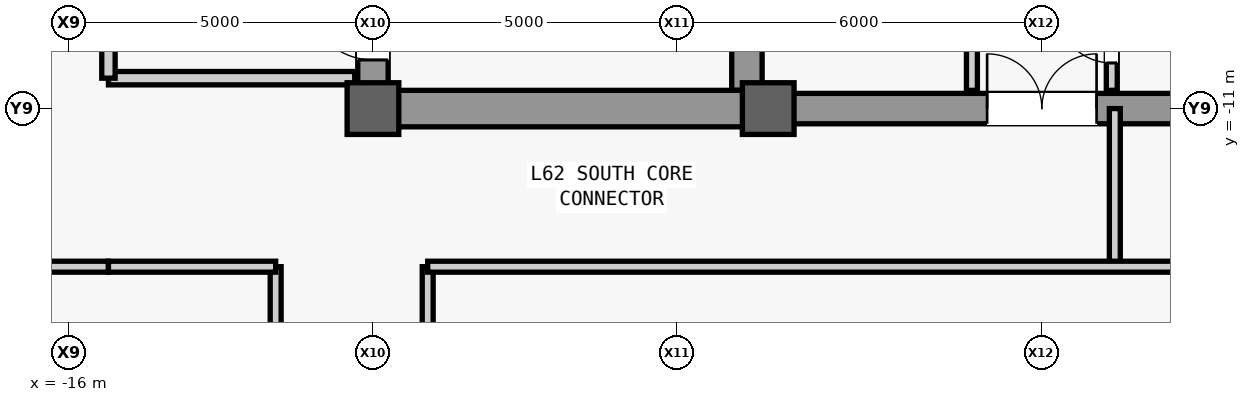
"""IFC4 building model, lengths in metres.
Left out: names, types, materials, properties, quantities, classifications, styles, units other than length and angle.
Written with IfcOpenShell. Run it as: python <this file> out.ifc"""

import sys

from ifc_helpers import new_model, si_unit, direction, frame, frame_2d, origin, origin_2d, place, context, subcontext, project, spatial, rectangle, extrude, source, transform, mapped, element, fill, save


model = new_model("IFC4")
c1 = context("Model", 3, precision=1e-05, world=origin(), true_north=direction((0.0, 1.0)))
c2 = subcontext(c1, "Body", "Model", "MODEL_VIEW")
j1 = project(units=[si_unit("LENGTHUNIT", "METRE"), si_unit("PLANEANGLEUNIT", "RADIAN")], contexts=[c1])
p1 = place(None, origin())
s1 = spatial("IfcSite", under=j1, at=p1, CompositionType="ELEMENT")
p2 = place(p1, origin())
s2 = spatial("IfcBuilding", under=s1, at=p2, CompositionType="ELEMENT")
p3 = place(p2, frame((0.0, 0.0, 263.1)))
s3 = spatial("IfcBuildingStorey", under=s2, at=p3, CompositionType="ELEMENT", Elevation=263.1)
m1 = source(origin(), c2, "Body", "SweptSolid", [
    extrude(rectangle(XDim=22.0, YDim=0.5, at=frame_2d((11.0, 0.0))), origin(), (0.0, 0.0, 1.0), 4.6),
])
p4 = place(p3, frame((-11.0, -11.0, 0.0), z_axis=(0.0, 0.0, 1.0), x_axis=(0.0, 1.0, 0.0)))
e1 = element("IfcWall", 1, at=p4, inside=s3, PredefinedType="SHEAR", context=c2, shape_type="MappedRepresentation", body=[
    mapped(m1, transform((0.0, 0.0, 0.0), scale=1.0)),
])
m2 = source(origin(), c2, "Body", "SweptSolid", [
    extrude(rectangle(XDim=1.1, YDim=2.2, at=frame_2d((0.55, 1.1))), frame((0.0, 0.26, 0.0), z_axis=(0.0, -1.0, 0.0), x_axis=(1.0, 0.0, 0.0)), (0.0, 0.0, 1.0), 0.52),
])
p5 = place(p4, frame((0.8, 0.0, 0.0)))
e2 = element("IfcOpeningElement", 2, at=p5, cuts=e1, PredefinedType="OPENING", context=c2, shape_type="MappedRepresentation", body=[
    mapped(m2, transform((0.0, 0.0, 0.0), scale=1.0)),
])
p6 = place(p4, frame((12.5, 0.0, 0.0)))
e3 = element("IfcOpeningElement", 3, at=p6, cuts=e1, PredefinedType="OPENING", context=c2, shape_type="MappedRepresentation", body=[
    mapped(m2, transform((0.0, 0.0, 0.0), scale=1.0)),
])
m3 = source(origin(), c2, "Body", "SweptSolid", [
    extrude(rectangle(XDim=0.9, YDim=2.15, at=frame_2d((0.45, 1.075))), frame((0.0, 0.26, 0.0), z_axis=(0.0, -1.0, 0.0), x_axis=(1.0, 0.0, 0.0)), (0.0, 0.0, 1.0), 0.52),
])
p7 = place(p4, frame((6.2, 0.0, 0.0)))
e4 = element("IfcOpeningElement", 4, at=p7, cuts=e1, PredefinedType="OPENING", context=c2, shape_type="MappedRepresentation", body=[
    mapped(m3, transform((0.0, 0.0, 0.0), scale=1.0)),
])
p8 = place(p4, frame((8.05, 0.0, 0.0)))
e5 = element("IfcOpeningElement", 5, at=p8, cuts=e1, PredefinedType="OPENING", context=c2, shape_type="MappedRepresentation", body=[
    mapped(m3, transform((0.0, 0.0, 0.0), scale=1.0)),
])
m4 = source(origin(), c2, "Body", "SweptSolid", [
    extrude(rectangle(XDim=1.2, YDim=2.3, at=frame_2d((0.6, 1.15))), frame((0.0, 0.26, 0.0), z_axis=(0.0, -1.0, 0.0), x_axis=(1.0, 0.0, 0.0)), (0.0, 0.0, 1.0), 0.52),
])
p9 = place(p4, frame((14.6, 0.0, 0.0)))
e6 = element("IfcOpeningElement", 6, at=p9, cuts=e1, PredefinedType="OPENING", context=c2, shape_type="MappedRepresentation", body=[
    mapped(m4, transform((0.0, 0.0, 0.0), scale=1.0)),
])
p10 = place(p4, frame((18.2, 0.0, 0.0)))
e7 = element("IfcOpeningElement", 7, at=p10, cuts=e1, PredefinedType="OPENING", context=c2, shape_type="MappedRepresentation", body=[
    mapped(m4, transform((0.0, 0.0, 0.0), scale=1.0)),
])
m5 = source(origin(), c2, "Body", "SweptSolid", [
    extrude(rectangle(XDim=1.3, YDim=2.3, at=frame_2d((0.65, 1.15))), frame((0.0, 0.26, 0.0), z_axis=(0.0, -1.0, 0.0), x_axis=(1.0, 0.0, 0.0)), (0.0, 0.0, 1.0), 0.52),
])
p11 = place(p4, frame((2.7, 0.0, 0.0)))
e8 = element("IfcOpeningElement", 8, at=p11, cuts=e1, PredefinedType="OPENING", context=c2, shape_type="MappedRepresentation", body=[
    mapped(m5, transform((0.0, 0.0, 0.0), scale=1.0)),
])
m6 = source(origin(), c2, "Body", "SweptSolid", [
    extrude(rectangle(XDim=21.4, YDim=0.5, at=frame_2d((10.7, 0.0))), origin(), (0.0, 0.0, 1.0), 4.6),
])
p12 = place(p3, frame((-4.85, -10.7, 0.0), z_axis=(0.0, 0.0, 1.0), x_axis=(0.0, 1.0, 0.0)))
e9 = element("IfcWall", 9, at=p12, inside=s3, PredefinedType="SHEAR", context=c2, shape_type="MappedRepresentation", body=[
    mapped(m6, transform((0.0, 0.0, 0.0), scale=1.0)),
])
m7 = source(origin(), c2, "Body", "SweptSolid", [
    extrude(rectangle(XDim=5.9, YDim=0.6, at=frame_2d((2.95, 0.0))), origin(), (0.0, 0.0, 1.0), 4.6),
])
p13 = place(p3, frame((-10.75, -11.0, 0.0), z_axis=(0.0, 0.0, 1.0), x_axis=(1.0, 0.0, 0.0)))
e10 = element("IfcWall", 10, at=p13, inside=s3, PredefinedType="SHEAR", context=c2, shape_type="MappedRepresentation", body=[
    mapped(m7, transform((0.0, 0.0, 0.0), scale=1.0)),
])
m8 = source(origin(), c2, "Body", "SweptSolid", [
    extrude(rectangle(XDim=9.2, YDim=0.5, at=frame_2d((4.6, 0.0))), origin(), (0.0, 0.0, 1.0), 4.6),
])
p14 = place(p3, frame((-4.6, -11.0, 0.0), z_axis=(0.0, 0.0, 1.0), x_axis=(1.0, 0.0, 0.0)))
e11 = element("IfcWall", 11, at=p14, inside=s3, PredefinedType="SHEAR", context=c2, shape_type="MappedRepresentation", body=[
    mapped(m8, transform((0.0, 0.0, 0.0), scale=1.0)),
])
m9 = source(origin(), c2, "Body", "SweptSolid", [
    extrude(rectangle(XDim=1.8, YDim=2.25, at=frame_2d((0.9, 1.125))), frame((0.0, 0.26, 0.0), z_axis=(0.0, -1.0, 0.0), x_axis=(1.0, 0.0, 0.0)), (0.0, 0.0, 1.0), 0.52),
])
p15 = place(p14, frame((3.7, 0.0, 0.0)))
e12 = element("IfcOpeningElement", 12, at=p15, cuts=e11, PredefinedType="OPENING", context=c2, shape_type="MappedRepresentation", body=[
    mapped(m9, transform((0.0, 0.0, 0.0), scale=1.0)),
])
m10 = source(origin(), c2, "Body", "SweptSolid", [
    extrude(rectangle(XDim=0.85, YDim=0.85, at=origin_2d()), origin(), (0.0, 0.0, 1.0), 5.2),
])
for number, where, z_axis, x_axis in (
    (13, (-11.0, -11.0, 0.0), (0.0, 0.0, 1.0), (1.0, 0.0, 0.0)),
    (14, (-4.5, -11.0, 0.0), (0.0, 0.0, 1.0), (1.0, 0.0, 0.0)),
):
    element("IfcColumn", number, at=place(p3, frame(where, z_axis=z_axis, x_axis=x_axis)), inside=s3, PredefinedType="COLUMN", context=c2, shape_type="MappedRepresentation", body=[
        mapped(m10, transform((0.0, 0.0, 0.0), scale=1.0)),
    ])
m11 = source(origin(), c2, "Body", "SweptSolid", [
    extrude(rectangle(XDim=4.05, YDim=0.22, at=frame_2d((2.025, 0.0))), origin(), (0.0, 0.0, 1.0), 4.6),
])
p16 = place(p3, frame((-15.35, -10.5, 0.0), z_axis=(0.0, 0.0, 1.0), x_axis=(1.0, 0.0, 0.0)))
e15 = element("IfcWall", 15, at=p16, inside=s3, PredefinedType="PARTITIONING", context=c2, shape_type="MappedRepresentation", body=[
    mapped(m11, transform((0.0, 0.0, 0.0), scale=1.0)),
])
m12 = source(origin(), c2, "Body", "SweptSolid", [
    extrude(rectangle(XDim=4.4, YDim=0.22, at=frame_2d((2.2, 0.0))), origin(), (0.0, 0.0, 1.0), 4.6),
])
p17 = place(p3, frame((-15.35, -10.5, 0.0), z_axis=(0.0, 0.0, 1.0), x_axis=(0.0, 1.0, 0.0)))
e16 = element("IfcWall", 16, at=p17, inside=s3, PredefinedType="PARTITIONING", context=c2, shape_type="MappedRepresentation", body=[
    mapped(m12, transform((0.0, 0.0, 0.0), scale=1.0)),
])
m13 = source(origin(), c2, "Body", "SweptSolid", [
    extrude(rectangle(XDim=1.2, YDim=2.2, at=frame_2d((0.6, 1.1))), frame((0.0, 0.12, 0.0), z_axis=(0.0, -1.0, 0.0), x_axis=(1.0, 0.0, 0.0)), (0.0, 0.0, 1.0), 0.24),
])
p18 = place(p17, frame((1.6, 0.0, 0.0)))
e17 = element("IfcOpeningElement", 17, at=p18, cuts=e16, PredefinedType="OPENING", context=c2, shape_type="MappedRepresentation", body=[
    mapped(m13, transform((0.0, 0.0, 0.0), scale=1.0)),
])
m14 = source(origin(), c2, "Body", "SweptSolid", [
    extrude(rectangle(XDim=5.4, YDim=0.18, at=frame_2d((2.7, 0.0))), origin(), (0.0, 0.0, 1.0), 4.6),
])
p19 = place(p3, frame((-1.15, -10.7, 0.0), z_axis=(0.0, 0.0, 1.0), x_axis=(0.0, 1.0, 0.0)))
e18 = element("IfcWall", 18, at=p19, inside=s3, PredefinedType="PARTITIONING", context=c2, shape_type="MappedRepresentation", body=[
    mapped(m14, transform((0.0, 0.0, 0.0), scale=1.0)),
])
m15 = source(origin(), c2, "Body", "SweptSolid", [
    extrude(rectangle(XDim=0.9, YDim=2.15, at=frame_2d((0.45, 1.075))), frame((0.0, 0.1, 0.0), z_axis=(0.0, -1.0, 0.0), x_axis=(1.0, 0.0, 0.0)), (0.0, 0.0, 1.0), 0.2),
])
p20 = place(p19, frame((2.25, 0.0, 0.0)))
e19 = element("IfcOpeningElement", 19, at=p20, cuts=e18, PredefinedType="OPENING", context=c2, shape_type="MappedRepresentation", body=[
    mapped(m15, transform((0.0, 0.0, 0.0), scale=1.0)),
])
p21 = place(p3, frame((1.15, -10.7, 0.0), z_axis=(0.0, 0.0, 1.0), x_axis=(0.0, 1.0, 0.0)))
e20 = element("IfcWall", 20, at=p21, inside=s3, PredefinedType="PARTITIONING", context=c2, shape_type="MappedRepresentation", body=[
    mapped(m14, transform((0.0, 0.0, 0.0), scale=1.0)),
])
p22 = place(p21, frame((0.45, 0.0, 0.0)))
e21 = element("IfcOpeningElement", 21, at=p22, cuts=e20, PredefinedType="OPENING", context=c2, shape_type="MappedRepresentation", body=[
    mapped(m15, transform((0.0, 0.0, 0.0), scale=1.0)),
])
p23 = place(p21, frame((2.25, 0.0, 0.0)))
e22 = element("IfcOpeningElement", 22, at=p23, cuts=e20, PredefinedType="OPENING", context=c2, shape_type="MappedRepresentation", body=[
    mapped(m15, transform((0.0, 0.0, 0.0), scale=1.0)),
])
p24 = place(p21, frame((4.05, 0.0, 0.0)))
e23 = element("IfcOpeningElement", 23, at=p24, cuts=e20, PredefinedType="OPENING", context=c2, shape_type="MappedRepresentation", body=[
    mapped(m15, transform((0.0, 0.0, 0.0), scale=1.0)),
])
m16 = source(origin(), c2, "Body", "SweptSolid", [
    extrude(rectangle(XDim=2.45, YDim=0.18, at=frame_2d((1.225, 0.0))), origin(), (0.0, 0.0, 1.0), 4.6),
])
p25 = place(p3, frame((-17.8, -13.6, 0.0), z_axis=(0.0, 0.0, 1.0), x_axis=(1.0, 0.0, 0.0)))
e24 = element("IfcWall", 24, at=p25, inside=s3, PredefinedType="PARTITIONING", context=c2, shape_type="MappedRepresentation", body=[
    mapped(m16, transform((0.0, 0.0, 0.0), scale=1.0)),
])
m17 = source(origin(), c2, "Body", "SweptSolid", [
    extrude(rectangle(XDim=2.6, YDim=0.18, at=frame_2d((1.3, 0.0))), origin(), (0.0, 0.0, 1.0), 4.6),
])
p26 = place(p3, frame((1.2, -13.6, 0.0), z_axis=(0.0, 0.0, 1.0), x_axis=(0.0, 1.0, 0.0)))
e25 = element("IfcWall", 25, at=p26, inside=s3, PredefinedType="PARTITIONING", context=c2, shape_type="MappedRepresentation", body=[
    mapped(m17, transform((0.0, 0.0, 0.0), scale=1.0)),
])
m18 = source(origin(), c2, "Body", "SweptSolid", [
    extrude(rectangle(XDim=16.4, YDim=0.18, at=frame_2d((8.2, 0.0))), origin(), (0.0, 0.0, 1.0), 4.6),
])
p27 = place(p3, frame((-12.6, -30.0, 0.0), z_axis=(0.0, 0.0, 1.0), x_axis=(0.0, 1.0, 0.0)))
e26 = element("IfcWall", 26, at=p27, inside=s3, PredefinedType="PARTITIONING", context=c2, shape_type="MappedRepresentation", body=[
    mapped(m18, transform((0.0, 0.0, 0.0), scale=1.0)),
])
m19 = source(origin(), c2, "Body", "SweptSolid", [
    extrude(rectangle(XDim=1.05, YDim=2.2, at=frame_2d((0.525, 1.1))), frame((0.0, 0.1, 0.0), z_axis=(0.0, -1.0, 0.0), x_axis=(1.0, 0.0, 0.0)), (0.0, 0.0, 1.0), 0.2),
])
p28 = place(p27, frame((3.575, 0.0, 0.0)))
e27 = element("IfcOpeningElement", 27, at=p28, cuts=e26, PredefinedType="OPENING", context=c2, shape_type="MappedRepresentation", body=[
    mapped(m19, transform((0.0, 0.0, 0.0), scale=1.0)),
])
m20 = source(origin(), c2, "Body", "SweptSolid", [
    extrude(rectangle(XDim=2.75, YDim=0.18, at=frame_2d((1.375, 0.0))), origin(), (0.0, 0.0, 1.0), 4.6),
])
p29 = place(p3, frame((-15.35, -13.6, 0.0), z_axis=(0.0, 0.0, 1.0), x_axis=(1.0, 0.0, 0.0)))
e28 = element("IfcWall", 28, at=p29, inside=s3, PredefinedType="PARTITIONING", context=c2, shape_type="MappedRepresentation", body=[
    mapped(m20, transform((0.0, 0.0, 0.0), scale=1.0)),
])
p30 = place(p3, frame((-10.1, -30.0, 0.0), z_axis=(0.0, 0.0, 1.0), x_axis=(0.0, 1.0, 0.0)))
e29 = element("IfcWall", 29, at=p30, inside=s3, PredefinedType="PARTITIONING", context=c2, shape_type="MappedRepresentation", body=[
    mapped(m18, transform((0.0, 0.0, 0.0), scale=1.0)),
])
p31 = place(p30, frame((3.575, 0.0, 0.0)))
e30 = element("IfcOpeningElement", 30, at=p31, cuts=e29, PredefinedType="OPENING", context=c2, shape_type="MappedRepresentation", body=[
    mapped(m19, transform((0.0, 0.0, 0.0), scale=1.0)),
])
m21 = source(origin(), c2, "Body", "SweptSolid", [
    extrude(rectangle(XDim=25.45, YDim=0.18, at=frame_2d((12.725, 0.0))), origin(), (0.0, 0.0, 1.0), 4.6),
])
p32 = place(p3, frame((-10.1, -13.6, 0.0), z_axis=(0.0, 0.0, 1.0), x_axis=(1.0, 0.0, 0.0)))
e31 = element("IfcWall", 31, at=p32, inside=s3, PredefinedType="PARTITIONING", context=c2, shape_type="MappedRepresentation", body=[
    mapped(m21, transform((0.0, 0.0, 0.0), scale=1.0)),
])
m22 = source(origin(), c2, "Body", "SweptSolid", [
    extrude(rectangle(XDim=1.1, YDim=2.2, at=frame_2d((0.55, 1.1))), frame((0.0, 0.025, 0.0), z_axis=(0.0, -1.0, 0.0), x_axis=(1.0, 0.0, 0.0)), (0.0, 0.0, 1.0), 0.05),
])
p33 = place(p5, origin())
e32 = element("IfcDoor", 32, at=p33, inside=s3, OperationType="SINGLE_SWING_RIGHT", PredefinedType="DOOR", context=c2, shape_type="MappedRepresentation", body=[
    mapped(m22, transform((0.0, 0.0, 0.0), scale=1.0)),
])
fill(e2, e32)
m23 = source(origin(), c2, "Body", "SweptSolid", [
    extrude(rectangle(XDim=0.9, YDim=2.15, at=frame_2d((0.45, 1.075))), frame((0.0, 0.025, 0.0), z_axis=(0.0, -1.0, 0.0), x_axis=(1.0, 0.0, 0.0)), (0.0, 0.0, 1.0), 0.05),
])
p34 = place(p22, origin())
e33 = element("IfcDoor", 33, at=p34, inside=s3, OperationType="SINGLE_SWING_RIGHT", PredefinedType="DOOR", context=c2, shape_type="MappedRepresentation", body=[
    mapped(m23, transform((0.0, 0.0, 0.0), scale=1.0)),
])
fill(e21, e33)
m24 = source(origin(), c2, "Body", "SweptSolid", [
    extrude(rectangle(XDim=1.8, YDim=2.25, at=frame_2d((0.9, 1.125))), frame((0.0, 0.025, 0.0), z_axis=(0.0, -1.0, 0.0), x_axis=(1.0, 0.0, 0.0)), (0.0, 0.0, 1.0), 0.05),
])
p35 = place(p15, origin())
e34 = element("IfcDoor", 34, at=p35, inside=s3, OperationType="SINGLE_SWING_LEFT", PredefinedType="DOOR", context=c2, shape_type="MappedRepresentation", body=[
    mapped(m24, transform((0.0, 0.0, 0.0), scale=1.0)),
])
fill(e12, e34)
save(model, sys.argv[1])
